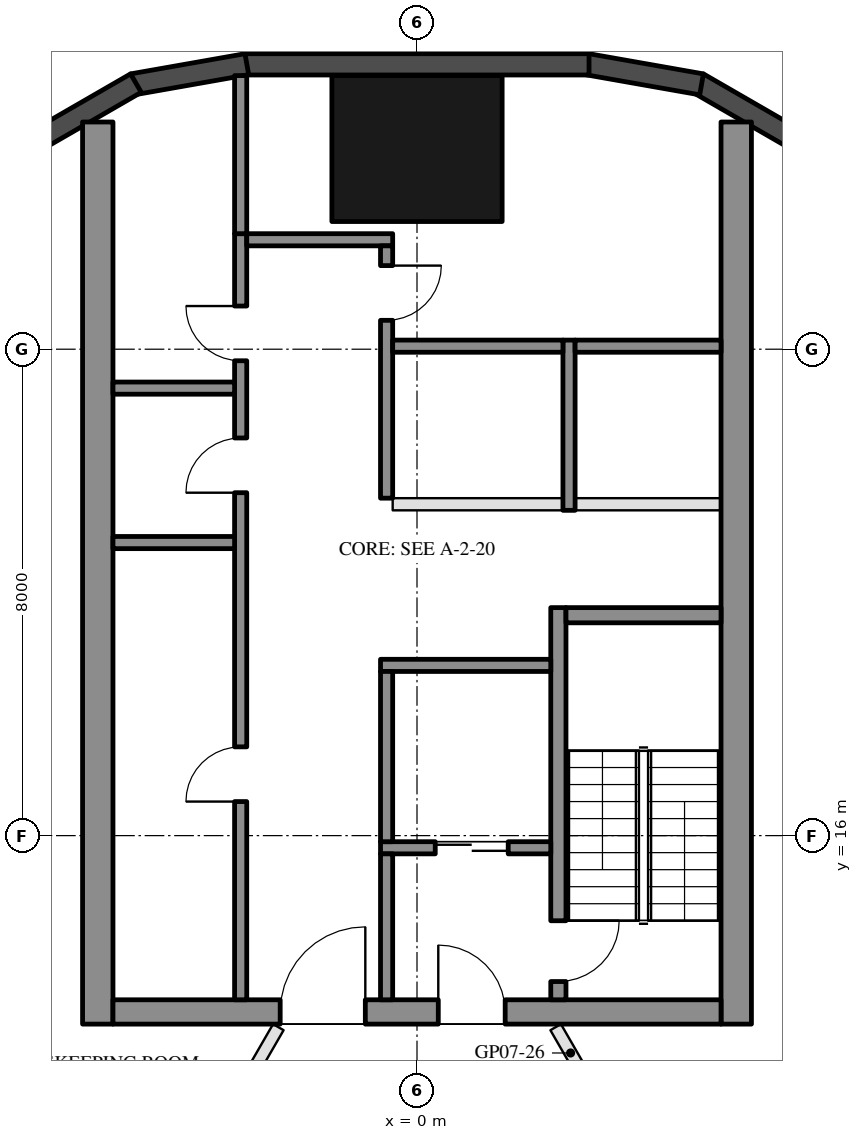
"""IFC4 building model, lengths in metres.
Left out: names, types, materials, properties, quantities, classifications, styles, units other than length and angle.
Written with IfcOpenShell. Run it as: python <this file> out.ifc"""

import sys

from ifc_helpers import new_model, si_unit, direction, frame, frame_2d, origin, origin_2d, place, context, subcontext, project, spatial, rectangle, hollow_rectangle, extrude, element, fill, save


model = new_model("IFC4")
c1 = context("Model", 3, precision=1e-05, world=origin(), true_north=direction((0.0, 1.0)))
c2 = subcontext(c1, "Body", "Model", "MODEL_VIEW")
j1 = project(units=[si_unit("LENGTHUNIT", "METRE"), si_unit("PLANEANGLEUNIT", "RADIAN")], contexts=[c1])
p1 = place(None, origin())
s1 = spatial("IfcSite", under=j1, at=p1, CompositionType="ELEMENT")
p2 = place(p1, origin())
s2 = spatial("IfcBuilding", under=s1, at=p2, CompositionType="ELEMENT")
p3 = place(p2, frame((0.0, 0.0, 94.6)))
s3 = spatial("IfcBuildingStorey", under=s2, at=p3, CompositionType="ELEMENT", Elevation=94.6)
p4 = place(p3, frame((0.0, 27.3, 0.0), z_axis=(0.0, 0.0, 1.0), x_axis=(1.0, 0.0, 0.0)))
e1 = element("IfcColumn", 1, at=p4, inside=s3, PredefinedType="COLUMN", context=c2, shape_type="SweptSolid", body=[
    extrude(hollow_rectangle(XDim=2.8, YDim=2.4, WallThickness=0.07, at=origin_2d()), origin(), (0.0, 0.0, 1.0), 3.7),
])
for number, where, z_axis, x_axis in (
    (2, (6.277, 27.422, 0.0), (0.0, 0.0, 1.0), (-0.866, 0.5, 0.0)),
    (3, (4.68, 28.356, 0.0), (0.0, 0.0, 1.0), (-0.985, 0.174, 0.0)),
):
    element("IfcWall", number, at=place(p3, frame(where, z_axis=z_axis, x_axis=x_axis)), inside=s3, PredefinedType="SOLIDWALL", context=c2, shape_type="SweptSolid", body=[
        extrude(rectangle(XDim=1.91, YDim=0.35, at=frame_2d((0.955, 0.0))), origin(), (0.0, 0.0, 1.0), 3.55),
    ])
p5 = place(p3, frame((2.829, 28.685, 0.0), z_axis=(0.0, 0.0, 1.0), x_axis=(-1.0, 0.0, 0.0)))
e4 = element("IfcWall", 4, at=p5, inside=s3, PredefinedType="SOLIDWALL", context=c2, shape_type="SweptSolid", body=[
    extrude(rectangle(XDim=5.658, YDim=0.35, at=frame_2d((2.829, 0.0))), origin(), (0.0, 0.0, 1.0), 3.55),
])
for number, where, z_axis, x_axis in (
    (5, (-2.799, 28.688, 0.0), (0.0, 0.0, 1.0), (-0.985, -0.174, 0.0)),
    (6, (-4.623, 28.377, 0.0), (0.0, 0.0, 1.0), (-0.866, -0.5, 0.0)),
):
    element("IfcWall", number, at=place(p3, frame(where, z_axis=z_axis, x_axis=x_axis)), inside=s3, PredefinedType="SOLIDWALL", context=c2, shape_type="SweptSolid", body=[
        extrude(rectangle(XDim=1.91, YDim=0.35, at=frame_2d((0.955, 0.0))), origin(), (0.0, 0.0, 1.0), 3.55),
    ])
for number, where, z_axis, x_axis in (
    (7, (5.25, 12.9, 0.0), (0.0, 0.0, 1.0), (0.0, 1.0, 0.0)),
    (8, (-5.25, 12.9, 0.0), (0.0, 0.0, 1.0), (0.0, 1.0, 0.0)),
):
    element("IfcWall", number, at=place(p3, frame(where, z_axis=z_axis, x_axis=x_axis)), inside=s3, PredefinedType="SHEAR", context=c2, shape_type="SweptSolid", body=[
        extrude(rectangle(XDim=14.837, YDim=0.5, at=frame_2d((7.418, 0.0))), origin(), (0.0, 0.0, 1.0), 3.5),
    ])
p6 = place(p3, frame((5.0, 13.1, 0.0), z_axis=(0.0, 0.0, 1.0), x_axis=(-1.0, 0.0, 0.0)))
e9 = element("IfcWall", 9, at=p6, inside=s3, PredefinedType="SHEAR", context=c2, shape_type="SweptSolid", body=[
    extrude(rectangle(XDim=10.0, YDim=0.4, at=frame_2d((5.0, 0.0))), origin(), (0.0, 0.0, 1.0), 3.5),
])
p7 = place(p6, frame((3.55, 0.0, 0.0)))
e10 = element("IfcOpeningElement", 10, at=p7, cuts=e9, PredefinedType="OPENING", context=c2, shape_type="SweptSolid", body=[
    extrude(rectangle(XDim=1.1, YDim=2.1, at=frame_2d((0.55, 1.05))), frame((0.0, 0.21, 0.0), z_axis=(0.0, -1.0, 0.0), x_axis=(1.0, 0.0, 0.0)), (0.0, 0.0, 1.0), 0.42),
])
p8 = place(p6, frame((5.85, 0.0, 0.0)))
e11 = element("IfcOpeningElement", 11, at=p8, cuts=e9, PredefinedType="OPENING", context=c2, shape_type="SweptSolid", body=[
    extrude(rectangle(XDim=1.4, YDim=2.1, at=frame_2d((0.7, 1.05))), frame((0.0, 0.21, 0.0), z_axis=(0.0, -1.0, 0.0), x_axis=(1.0, 0.0, 0.0)), (0.0, 0.0, 1.0), 0.42),
])
p9 = place(p3, frame((2.325, 13.3, 0.0), z_axis=(0.0, 0.0, 1.0), x_axis=(0.0, 1.0, 0.0)))
e12 = element("IfcWall", 12, at=p9, inside=s3, PredefinedType="SHEAR", context=c2, shape_type="SweptSolid", body=[
    extrude(rectangle(XDim=6.45, YDim=0.25, at=frame_2d((3.225, 0.0))), origin(), (0.0, 0.0, 1.0), 3.5),
])
p10 = place(p9, frame((0.3, 0.0, 0.0)))
e13 = element("IfcOpeningElement", 13, at=p10, cuts=e12, PredefinedType="OPENING", context=c2, shape_type="SweptSolid", body=[
    extrude(rectangle(XDim=1.0, YDim=2.1, at=frame_2d((0.5, 1.05))), frame((0.0, 0.135, 0.0), z_axis=(0.0, -1.0, 0.0), x_axis=(1.0, 0.0, 0.0)), (0.0, 0.0, 1.0), 0.27),
])
p11 = place(p3, frame((5.0, 19.625, 0.0), z_axis=(0.0, 0.0, 1.0), x_axis=(-1.0, 0.0, 0.0)))
e14 = element("IfcWall", 14, at=p11, inside=s3, PredefinedType="SHEAR", context=c2, shape_type="SweptSolid", body=[
    extrude(rectangle(XDim=2.55, YDim=0.25, at=frame_2d((1.275, 0.0))), origin(), (0.0, 0.0, 1.0), 3.5),
])
p12 = place(p3, frame((2.2, 18.8, 0.0), z_axis=(0.0, 0.0, 1.0), x_axis=(-1.0, 0.0, 0.0)))
e15 = element("IfcWall", 15, at=p12, inside=s3, PredefinedType="SHEAR", context=c2, shape_type="SweptSolid", body=[
    extrude(rectangle(XDim=2.8, YDim=0.2, at=frame_2d((1.4, 0.0))), origin(), (0.0, 0.0, 1.0), 3.5),
])
p13 = place(p3, frame((2.2, 15.8, 0.0), z_axis=(0.0, 0.0, 1.0), x_axis=(-1.0, 0.0, 0.0)))
e16 = element("IfcWall", 16, at=p13, inside=s3, PredefinedType="SHEAR", context=c2, shape_type="SweptSolid", body=[
    extrude(rectangle(XDim=2.8, YDim=0.2, at=frame_2d((1.4, 0.0))), origin(), (0.0, 0.0, 1.0), 3.5),
])
p14 = place(p13, frame((0.7, 0.0, 0.0)))
e17 = element("IfcOpeningElement", 17, at=p14, cuts=e16, PredefinedType="OPENING", context=c2, shape_type="SweptSolid", body=[
    extrude(rectangle(XDim=1.2, YDim=2.1, at=frame_2d((0.6, 1.05))), frame((0.0, 0.11, 0.0), z_axis=(0.0, -1.0, 0.0), x_axis=(1.0, 0.0, 0.0)), (0.0, 0.0, 1.0), 0.22),
])
p15 = place(p3, frame((-0.5, 15.9, 0.0), z_axis=(0.0, 0.0, 1.0), x_axis=(0.0, 1.0, 0.0)))
e18 = element("IfcWall", 18, at=p15, inside=s3, PredefinedType="SHEAR", context=c2, shape_type="SweptSolid", body=[
    extrude(rectangle(XDim=2.8, YDim=0.2, at=frame_2d((1.4, 0.0))), origin(), (0.0, 0.0, 1.0), 3.5),
])
p16 = place(p3, frame((-0.5, 13.3, 0.0), z_axis=(0.0, 0.0, 1.0), x_axis=(0.0, 1.0, 0.0)))
e19 = element("IfcWall", 19, at=p16, inside=s3, PredefinedType="SHEAR", context=c2, shape_type="SweptSolid", body=[
    extrude(rectangle(XDim=2.4, YDim=0.2, at=frame_2d((1.2, 0.0))), origin(), (0.0, 0.0, 1.0), 3.5),
])
p17 = place(p3, frame((-2.9, 13.3, 0.0), z_axis=(0.0, 0.0, 1.0), x_axis=(0.0, 1.0, 0.0)))
e20 = element("IfcWall", 20, at=p17, inside=s3, PredefinedType="SHEAR", context=c2, shape_type="SweptSolid", body=[
    extrude(rectangle(XDim=12.6, YDim=0.2, at=frame_2d((6.3, 0.0))), origin(), (0.0, 0.0, 1.0), 3.5),
])
p18 = place(p17, frame((3.26, 0.0, 0.0)))
e21 = element("IfcOpeningElement", 21, at=p18, cuts=e20, PredefinedType="OPENING", context=c2, shape_type="SweptSolid", body=[
    extrude(rectangle(XDim=0.9, YDim=2.1, at=frame_2d((0.45, 1.05))), frame((0.0, 0.11, 0.0), z_axis=(0.0, -1.0, 0.0), x_axis=(1.0, 0.0, 0.0)), (0.0, 0.0, 1.0), 0.22),
])
p19 = place(p17, frame((8.34, 0.0, 0.0)))
e22 = element("IfcOpeningElement", 22, at=p19, cuts=e20, PredefinedType="OPENING", context=c2, shape_type="SweptSolid", body=[
    extrude(rectangle(XDim=0.9, YDim=2.1, at=frame_2d((0.45, 1.05))), frame((0.0, 0.11, 0.0), z_axis=(0.0, -1.0, 0.0), x_axis=(1.0, 0.0, 0.0)), (0.0, 0.0, 1.0), 0.22),
])
p20 = place(p17, frame((10.51, 0.0, 0.0)))
e23 = element("IfcOpeningElement", 23, at=p20, cuts=e20, PredefinedType="OPENING", context=c2, shape_type="SweptSolid", body=[
    extrude(rectangle(XDim=0.9, YDim=2.1, at=frame_2d((0.45, 1.05))), frame((0.0, 0.11, 0.0), z_axis=(0.0, -1.0, 0.0), x_axis=(1.0, 0.0, 0.0)), (0.0, 0.0, 1.0), 0.22),
])
p21 = place(p3, frame((-0.4, 25.8, 0.0), z_axis=(0.0, 0.0, 1.0), x_axis=(-1.0, 0.0, 0.0)))
e24 = element("IfcWall", 24, at=p21, inside=s3, PredefinedType="SHEAR", context=c2, shape_type="SweptSolid", body=[
    extrude(rectangle(XDim=2.4, YDim=0.2, at=frame_2d((1.2, 0.0))), origin(), (0.0, 0.0, 1.0), 3.5),
])
p22 = place(p3, frame((-0.5, 21.55, 0.0), z_axis=(0.0, 0.0, 1.0), x_axis=(0.0, 1.0, 0.0)))
e25 = element("IfcWall", 25, at=p22, inside=s3, PredefinedType="SHEAR", context=c2, shape_type="SweptSolid", body=[
    extrude(rectangle(XDim=4.15, YDim=0.2, at=frame_2d((2.075, 0.0))), origin(), (0.0, 0.0, 1.0), 3.5),
])
p23 = place(p22, frame((2.925, 0.0, 0.0)))
e26 = element("IfcOpeningElement", 26, at=p23, cuts=e25, PredefinedType="OPENING", context=c2, shape_type="SweptSolid", body=[
    extrude(rectangle(XDim=0.9, YDim=2.1, at=frame_2d((0.45, 1.05))), frame((0.0, 0.11, 0.0), z_axis=(0.0, -1.0, 0.0), x_axis=(1.0, 0.0, 0.0)), (0.0, 0.0, 1.0), 0.22),
])
for number, where, z_axis, x_axis in (
    (27, (-3.0, 20.82, 0.0), (0.0, 0.0, 1.0), (-1.0, 0.0, 0.0)),
    (28, (-3.0, 23.36, 0.0), (0.0, 0.0, 1.0), (-1.0, 0.0, 0.0)),
):
    element("IfcWall", number, at=place(p3, frame(where, z_axis=z_axis, x_axis=x_axis)), inside=s3, PredefinedType="SHEAR", context=c2, shape_type="SweptSolid", body=[
        extrude(rectangle(XDim=2.0, YDim=0.2, at=frame_2d((1.0, 0.0))), origin(), (0.0, 0.0, 1.0), 3.5),
    ])
p24 = place(p3, frame((-2.9, 25.9, 0.0), z_axis=(0.0, 0.0, 1.0), x_axis=(0.0, 1.0, 0.0)))
e29 = element("IfcWall", 29, at=p24, inside=s3, PredefinedType="SHEAR", context=c2, shape_type="SweptSolid", body=[
    extrude(rectangle(XDim=2.6, YDim=0.2, at=frame_2d((1.3, 0.0))), origin(), (0.0, 0.0, 1.0), 3.5),
])
p25 = place(p3, frame((2.5, 21.35, 0.0), z_axis=(0.0, 0.0, 1.0), x_axis=(0.0, 1.0, 0.0)))
e30 = element("IfcWall", 30, at=p25, inside=s3, PredefinedType="SHEAR", context=c2, shape_type="SweptSolid", body=[
    extrude(rectangle(XDim=2.8, YDim=0.2, at=frame_2d((1.4, 0.0))), origin(), (0.0, 0.0, 1.0), 3.5),
])
p26 = place(p3, frame((5.0, 24.05, 0.0), z_axis=(0.0, 0.0, 1.0), x_axis=(-1.0, 0.0, 0.0)))
e31 = element("IfcWall", 31, at=p26, inside=s3, PredefinedType="SHEAR", context=c2, shape_type="SweptSolid", body=[
    extrude(rectangle(XDim=2.4, YDim=0.2, at=frame_2d((1.2, 0.0))), origin(), (0.0, 0.0, 1.0), 3.5),
])
p27 = place(p3, frame((2.4, 24.05, 0.0), z_axis=(0.0, 0.0, 1.0), x_axis=(-1.0, 0.0, 0.0)))
e32 = element("IfcWall", 32, at=p27, inside=s3, PredefinedType="SHEAR", context=c2, shape_type="SweptSolid", body=[
    extrude(rectangle(XDim=2.8, YDim=0.2, at=frame_2d((1.4, 0.0))), origin(), (0.0, 0.0, 1.0), 3.5),
])
p28 = place(p3, frame((5.0, 21.45, 0.0), z_axis=(0.0, 0.0, 1.0), x_axis=(-1.0, 0.0, 0.0)))
e33 = element("IfcWall", 33, at=p28, inside=s3, PredefinedType="PARTITIONING", context=c2, shape_type="SweptSolid", body=[
    extrude(rectangle(XDim=2.4, YDim=0.2, at=frame_2d((1.2, 0.0))), origin(), (0.0, 0.0, 1.0), 3.5),
])
p29 = place(p3, frame((2.4, 21.45, 0.0), z_axis=(0.0, 0.0, 1.0), x_axis=(-1.0, 0.0, 0.0)))
e34 = element("IfcWall", 34, at=p29, inside=s3, PredefinedType="PARTITIONING", context=c2, shape_type="SweptSolid", body=[
    extrude(rectangle(XDim=2.8, YDim=0.2, at=frame_2d((1.4, 0.0))), origin(), (0.0, 0.0, 1.0), 3.5),
])
p30 = place(p3, frame((13.797, 14.663, 0.0), z_axis=(0.0, 0.0, 1.0), x_axis=(-0.866027479907, -0.499996404033, 0.0)))
e35 = element("IfcWall", 35, at=p30, inside=s3, PredefinedType="PARTITIONING", context=c2, shape_type="SweptSolid", body=[
    extrude(rectangle(XDim=10.98, YDim=0.2, at=frame_2d((5.49, 0.0))), origin(), (0.0, 0.0, 1.0), 2.96),
])
p31 = place(p3, frame((-13.928, 12.636, 0.0), z_axis=(0.0, 0.0, 1.0), x_axis=(0.881791431821, -0.471639555981, 0.0)))
e36 = element("IfcWall", 36, at=p31, inside=s3, PredefinedType="PARTITIONING", context=c2, shape_type="SweptSolid", body=[
    extrude(rectangle(XDim=10.085, YDim=0.2, at=frame_2d((5.042, 0.0))), origin(), (0.0, 0.0, 1.0), 2.95),
])
p32 = place(p3, frame((2.281, 12.85, 0.0), z_axis=(0.0, 0.0, 1.0), x_axis=(0.500011931275, -0.86601851515, 0.0)))
e37 = element("IfcWall", 37, at=p32, inside=s3, PredefinedType="PARTITIONING", context=c2, shape_type="SweptSolid", body=[
    extrude(rectangle(XDim=4.088, YDim=0.2, at=frame_2d((2.044, 0.0))), origin(), (0.0, 0.0, 1.0), 2.95),
])
p33 = place(p32, frame((1.544, 0.0, 0.0)))
e38 = element("IfcOpeningElement", 38, at=p33, cuts=e37, PredefinedType="OPENING", context=c2, shape_type="SweptSolid", body=[
    extrude(rectangle(XDim=1.0, YDim=2.1, at=frame_2d((0.5, 1.05))), frame((0.0, 0.11, 0.0), z_axis=(0.0, -1.0, 0.0), x_axis=(1.0, 0.0, 0.0)), (0.0, 0.0, 1.0), 0.22),
])
p34 = place(p3, frame((-5.073, 8.013, 0.0), z_axis=(0.0, 0.0, 1.0), x_axis=(0.500003731568, 0.866023249352, 0.0)))
e39 = element("IfcWall", 39, at=p34, inside=s3, PredefinedType="PARTITIONING", context=c2, shape_type="SweptSolid", body=[
    extrude(rectangle(XDim=5.585, YDim=0.2, at=frame_2d((2.792, 0.0))), origin(), (0.0, 0.0, 1.0), 2.95),
])
p35 = place(p34, frame((2.292, 0.0, 0.0)))
e40 = element("IfcOpeningElement", 40, at=p35, cuts=e39, PredefinedType="OPENING", context=c2, shape_type="SweptSolid", body=[
    extrude(rectangle(XDim=1.0, YDim=2.1, at=frame_2d((0.5, 1.05))), frame((0.0, 0.11, 0.0), z_axis=(0.0, -1.0, 0.0), x_axis=(1.0, 0.0, 0.0)), (0.0, 0.0, 1.0), 0.22),
])
p36 = place(p14, origin())
e41 = element("IfcDoor", 41, at=p36, inside=s3, OperationType="DOUBLE_DOOR_SLIDING", PredefinedType="DOOR", context=c2, shape_type="SweptSolid", body=[
    extrude(rectangle(XDim=1.2, YDim=2.1, at=frame_2d((0.6, 1.05))), frame((0.0, 0.025, 0.0), z_axis=(0.0, -1.0, 0.0), x_axis=(1.0, 0.0, 0.0)), (0.0, 0.0, 1.0), 0.05),
])
fill(e17, e41)
p37 = place(p18, origin())
e42 = element("IfcDoor", 42, at=p37, inside=s3, OperationType="SINGLE_SWING_LEFT", PredefinedType="DOOR", context=c2, shape_type="SweptSolid", body=[
    extrude(rectangle(XDim=0.9, YDim=2.1, at=frame_2d((0.45, 1.05))), frame((0.0, 0.025, 0.0), z_axis=(0.0, -1.0, 0.0), x_axis=(1.0, 0.0, 0.0)), (0.0, 0.0, 1.0), 0.05),
])
fill(e21, e42)
p38 = place(p19, origin())
e43 = element("IfcDoor", 43, at=p38, inside=s3, OperationType="SINGLE_SWING_LEFT", PredefinedType="DOOR", context=c2, shape_type="SweptSolid", body=[
    extrude(rectangle(XDim=0.9, YDim=2.1, at=frame_2d((0.45, 1.05))), frame((0.0, 0.025, 0.0), z_axis=(0.0, -1.0, 0.0), x_axis=(1.0, 0.0, 0.0)), (0.0, 0.0, 1.0), 0.05),
])
fill(e22, e43)
p39 = place(p20, origin())
e44 = element("IfcDoor", 44, at=p39, inside=s3, OperationType="SINGLE_SWING_RIGHT", PredefinedType="DOOR", context=c2, shape_type="SweptSolid", body=[
    extrude(rectangle(XDim=0.9, YDim=2.1, at=frame_2d((0.45, 1.05))), frame((0.0, 0.025, 0.0), z_axis=(0.0, -1.0, 0.0), x_axis=(1.0, 0.0, 0.0)), (0.0, 0.0, 1.0), 0.05),
])
fill(e23, e44)
p40 = place(p23, frame((0.9, 0.0, 0.0), z_axis=(0.0, 0.0, 1.0), x_axis=(-1.0, 0.0, 0.0)))
e45 = element("IfcDoor", 45, at=p40, inside=s3, OperationType="SINGLE_SWING_LEFT", PredefinedType="DOOR", context=c2, shape_type="SweptSolid", body=[
    extrude(rectangle(XDim=0.9, YDim=2.1, at=frame_2d((0.45, 1.05))), frame((0.0, 0.025, 0.0), z_axis=(0.0, -1.0, 0.0), x_axis=(1.0, 0.0, 0.0)), (0.0, 0.0, 1.0), 0.05),
])
fill(e26, e45)
p41 = place(p7, frame((1.1, 0.0, 0.0), z_axis=(0.0, 0.0, 1.0), x_axis=(-1.0, 0.0, 0.0)))
e46 = element("IfcDoor", 46, at=p41, inside=s3, OperationType="SINGLE_SWING_LEFT", PredefinedType="DOOR", context=c2, shape_type="SweptSolid", body=[
    extrude(rectangle(XDim=1.1, YDim=2.1, at=frame_2d((0.55, 1.05))), frame((0.0, 0.025, 0.0), z_axis=(0.0, -1.0, 0.0), x_axis=(1.0, 0.0, 0.0)), (0.0, 0.0, 1.0), 0.05),
])
fill(e10, e46)
p42 = place(p8, frame((1.4, 0.0, 0.0), z_axis=(0.0, 0.0, 1.0), x_axis=(-1.0, 0.0, 0.0)))
e47 = element("IfcDoor", 47, at=p42, inside=s3, OperationType="DOUBLE_DOOR_SINGLE_SWING", PredefinedType="DOOR", context=c2, shape_type="SweptSolid", body=[
    extrude(rectangle(XDim=1.4, YDim=2.1, at=frame_2d((0.7, 1.05))), frame((0.0, 0.025, 0.0), z_axis=(0.0, -1.0, 0.0), x_axis=(1.0, 0.0, 0.0)), (0.0, 0.0, 1.0), 0.05),
])
fill(e11, e47)
p43 = place(p10, frame((1.0, 0.0, 0.0), z_axis=(0.0, 0.0, 1.0), x_axis=(-1.0, 0.0, 0.0)))
e48 = element("IfcDoor", 48, at=p43, inside=s3, OperationType="SINGLE_SWING_LEFT", PredefinedType="DOOR", context=c2, shape_type="SweptSolid", body=[
    extrude(rectangle(XDim=1.0, YDim=2.1, at=frame_2d((0.5, 1.05))), frame((0.0, 0.025, 0.0), z_axis=(0.0, -1.0, 0.0), x_axis=(1.0, 0.0, 0.0)), (0.0, 0.0, 1.0), 0.05),
])
fill(e13, e48)
save(model, sys.argv[1])
